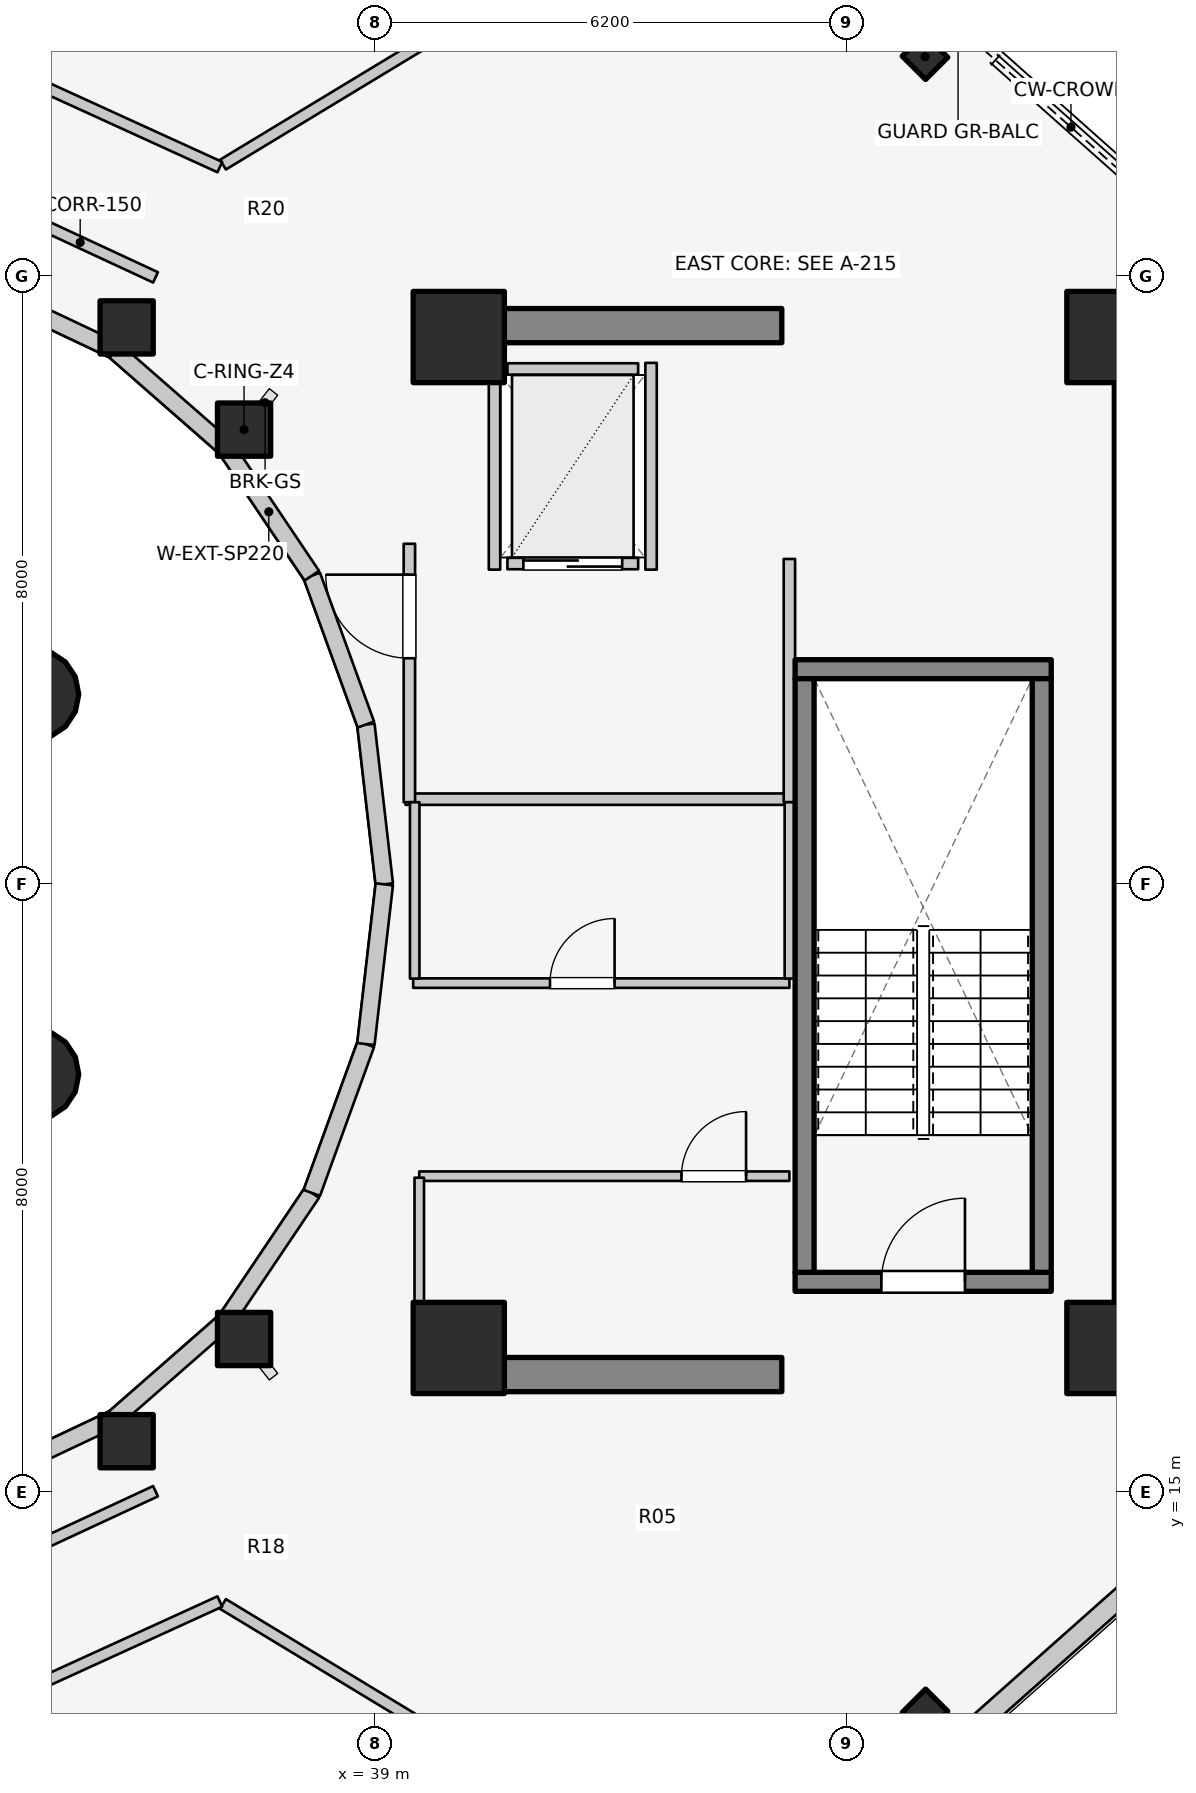
"""IFC4 building model, lengths in metres.
Left out: names, types, materials, properties, quantities, classifications, styles, units other than length and angle.
Written with IfcOpenShell. Run it as: python <this file> out.ifc"""

import sys

from ifc_helpers import new_model, si_unit, direction, frame, frame_2d, origin, origin_2d, place, context, subcontext, project, spatial, rectangle, hollow_circle, i_section, extrude, element, fill, save


model = new_model("IFC4")
c1 = context("Model", 3, precision=1e-05, world=origin(), true_north=direction((0.0, 1.0)))
c2 = subcontext(c1, "Body", "Model", "MODEL_VIEW")
j1 = project(units=[si_unit("LENGTHUNIT", "METRE"), si_unit("PLANEANGLEUNIT", "RADIAN")], contexts=[c1])
p1 = place(None, origin())
s1 = spatial("IfcSite", under=j1, at=p1, CompositionType="ELEMENT")
p2 = place(p1, origin())
s2 = spatial("IfcBuilding", under=s1, at=p2, CompositionType="ELEMENT")
p3 = place(p2, frame((0.0, 0.0, 266.8)))
s3 = spatial("IfcBuildingStorey", under=s2, at=p3, CompositionType="ELEMENT", Elevation=266.8)
p4 = place(p3, frame((48.95, 17.05, 0.0), z_axis=(0.0, 0.0, 1.0), x_axis=(0.0, 1.0, 0.0)))
e1 = element("IfcWall", 1, at=p4, inside=s3, PredefinedType="SHEAR", context=c2, shape_type="SweptSolid", body=[
    extrude(rectangle(XDim=12.8, YDim=0.45, at=frame_2d((6.4, 0.0))), origin(), (0.0, 0.0, 1.0), 3.2),
])
for number, where, z_axis, x_axis in (
    (2, (39.85, 16.55, 0.0), (0.0, 0.0, 1.0), (1.0, 0.0, 0.0)),
    (3, (39.85, 30.35, 0.0), (0.0, 0.0, 1.0), (1.0, 0.0, 0.0)),
):
    element("IfcWall", number, at=place(p3, frame(where, z_axis=z_axis, x_axis=x_axis)), inside=s3, PredefinedType="SHEAR", context=c2, shape_type="SweptSolid", body=[
        extrude(rectangle(XDim=4.5, YDim=0.45, at=frame_2d((2.25, 0.0))), origin(), (0.0, 0.0, 1.0), 3.2),
    ])
p5 = place(p3, frame((44.525, 17.77, 0.0), z_axis=(0.0, 0.0, 1.0), x_axis=(1.0, 0.0, 0.0)))
e4 = element("IfcWall", 4, at=p5, inside=s3, PredefinedType="SOLIDWALL", context=c2, shape_type="SweptSolid", body=[
    extrude(rectangle(XDim=3.37, YDim=0.25, at=frame_2d((1.685, 0.0))), origin(), (0.0, 0.0, 1.0), 3.2),
])
p6 = place(p5, frame((1.135, 0.0, 0.0)))
e5 = element("IfcOpeningElement", 5, at=p6, cuts=e4, PredefinedType="OPENING", context=c2, shape_type="SweptSolid", body=[
    extrude(rectangle(XDim=1.1, YDim=2.1, at=frame_2d((0.55, 1.05))), frame((0.0, 0.135, 0.0), z_axis=(0.0, -1.0, 0.0), x_axis=(1.0, 0.0, 0.0)), (0.0, 0.0, 1.0), 0.27),
])
p7 = place(p3, frame((44.525, 25.83, 0.0), z_axis=(0.0, 0.0, 1.0), x_axis=(1.0, 0.0, 0.0)))
e6 = element("IfcWall", 6, at=p7, inside=s3, PredefinedType="SOLIDWALL", context=c2, shape_type="SweptSolid", body=[
    extrude(rectangle(XDim=3.37, YDim=0.25, at=frame_2d((1.685, 0.0))), origin(), (0.0, 0.0, 1.0), 3.2),
])
for number, where, z_axis, x_axis in (
    (7, (44.65, 17.895, 0.0), (0.0, 0.0, 1.0), (0.0, 1.0, 0.0)),
    (8, (47.77, 17.895, 0.0), (0.0, 0.0, 1.0), (0.0, 1.0, 0.0)),
):
    element("IfcWall", number, at=place(p3, frame(where, z_axis=z_axis, x_axis=x_axis)), inside=s3, PredefinedType="SOLIDWALL", context=c2, shape_type="SweptSolid", body=[
        extrude(rectangle(XDim=7.81, YDim=0.25, at=frame_2d((3.905, 0.0))), origin(), (0.0, 0.0, 1.0), 3.2),
    ])
for number, where, z_axis, x_axis in (
    (9, (40.1, 16.9, 0.0), (0.0, 0.0, 1.0), (1.0, 0.0, 0.0)),
    (10, (48.7, 16.9, 0.0), (0.0, 0.0, 1.0), (1.0, 0.0, 0.0)),
    (11, (48.7, 30.2, 0.0), (0.0, 0.0, 1.0), (1.0, 0.0, 0.0)),
    (12, (40.1, 30.2, 0.0), (0.0, 0.0, 1.0), (1.0, 0.0, 0.0)),
):
    element("IfcColumn", number, at=place(p3, frame(where, z_axis=z_axis, x_axis=x_axis)), inside=s3, PredefinedType="COLUMN", context=c2, shape_type="SweptSolid", body=[
        extrude(rectangle(XDim=1.2, YDim=1.2, at=origin_2d()), origin(), (0.0, 0.0, 1.0), 3.2),
    ])
p8 = place(p3, frame((37.275, 28.982, 0.0), z_axis=(0.0, 0.0, 1.0), x_axis=(1.0, 0.0, 0.0)))
e13 = element("IfcColumn", 13, at=p8, inside=s3, PredefinedType="COLUMN", context=c2, shape_type="SweptSolid", body=[
    extrude(rectangle(XDim=0.7, YDim=0.7, at=origin_2d()), origin(), (0.0, 0.0, 1.0), 3.2),
])
p9 = place(p3, frame((46.234, 33.887, 0.0), z_axis=(0.0, 0.0, 1.0), x_axis=(0.707106781187, 0.707106781187, 0.0)))
e14 = element("IfcColumn", 14, at=p9, inside=s3, PredefinedType="COLUMN", context=c2, shape_type="SweptSolid", body=[
    extrude(i_section(OverallWidth=0.412, OverallDepth=0.435, WebThickness=0.036, FlangeThickness=0.057, FilletRadius=0.025, at=origin_2d()), origin(), (0.0, 0.0, 1.0), 3.2),
])
for number, where, z_axis, x_axis in (
    (15, (35.73, 30.327, 0.0), (0.0, 0.0, 1.0), (1.0, 0.0, 0.0)),
    (16, (35.73, 15.673, 0.0), (0.0, 0.0, 1.0), (1.0, 0.0, 0.0)),
    (17, (37.275, 17.018, 0.0), (0.0, 0.0, 1.0), (1.0, 0.0, 0.0)),
):
    element("IfcColumn", number, at=place(p3, frame(where, z_axis=z_axis, x_axis=x_axis)), inside=s3, PredefinedType="COLUMN", context=c2, shape_type="SweptSolid", body=[
        extrude(rectangle(XDim=0.7, YDim=0.7, at=origin_2d()), origin(), (0.0, 0.0, 1.0), 3.2),
    ])
p10 = place(p3, frame((46.234, 12.113, 0.0), z_axis=(0.0, 0.0, 1.0), x_axis=(0.707106781187, -0.707106781187, 0.0)))
e18 = element("IfcColumn", 18, at=p10, inside=s3, PredefinedType="COLUMN", context=c2, shape_type="SweptSolid", body=[
    extrude(i_section(OverallWidth=0.412, OverallDepth=0.435, WebThickness=0.036, FlangeThickness=0.057, FilletRadius=0.025, at=origin_2d()), origin(), (0.0, 0.0, 1.0), 3.2),
])
for number, where, z_axis, x_axis in (
    (19, (34.5, 20.5, 0.0), (0.0, 0.0, 1.0), (1.0, 0.0, 0.0)),
    (20, (34.5, 25.5, 0.0), (0.0, 0.0, 1.0), (1.0, 0.0, 0.0)),
):
    element("IfcColumn", number, at=place(p3, frame(where, z_axis=z_axis, x_axis=x_axis)), inside=s3, PredefinedType="PILASTER", context=c2, shape_type="SweptSolid", body=[
        extrude(hollow_circle(Radius=0.6, WallThickness=0.032, at=origin_2d()), origin(), (0.0, 0.0, 1.0), 3.2),
    ])
p11 = place(p3, frame((39.12, 23.0, 0.0), z_axis=(0.0, 0.0, 1.0), x_axis=(-0.114711713601, 0.993398823617, 0.0)))
e21 = element("IfcWall", 21, at=p11, inside=s3, PredefinedType="STANDARD", context=c2, shape_type="SweptSolid", body=[
    extrude(rectangle(XDim=2.115, YDim=0.23, at=frame_2d((1.058, 0.0))), origin(), (0.0, 0.0, 1.0), 2.9),
])
p12 = place(p3, frame((38.877, 25.102, 0.0), z_axis=(0.0, 0.0, 1.0), x_axis=(-0.341423187295, 0.93990968033, 0.0)))
e22 = element("IfcWall", 22, at=p12, inside=s3, PredefinedType="STANDARD", context=c2, shape_type="SweptSolid", body=[
    extrude(rectangle(XDim=2.084, YDim=0.23, at=frame_2d((1.042, 0.0))), origin(), (0.0, 0.0, 1.0), 2.9),
])
p13 = place(p3, frame((38.166, 27.06, 0.0), z_axis=(0.0, 0.0, 1.0), x_axis=(-0.558197800898, 0.829707909492, 0.0)))
e23 = element("IfcWall", 23, at=p13, inside=s3, PredefinedType="STANDARD", context=c2, shape_type="SweptSolid", body=[
    extrude(rectangle(XDim=2.027, YDim=0.23, at=frame_2d((1.013, 0.0))), origin(), (0.0, 0.0, 1.0), 1.32),
])
p14 = place(p3, frame((37.035, 28.742, 0.0), z_axis=(0.0, 0.0, 1.0), x_axis=(-0.752576694707, 0.658504607869, 0.0)))
e24 = element("IfcWall", 24, at=p14, inside=s3, PredefinedType="STANDARD", context=c2, shape_type="SweptSolid", body=[
    extrude(rectangle(XDim=1.959, YDim=0.23, at=frame_2d((0.98, 0.0))), origin(), (0.0, 0.0, 1.0), 1.32),
])
for number, where, z_axis, x_axis in (
    (25, (35.56, 30.032, 0.0), (0.0, 0.0, 1.0), (-0.904, 0.427, 0.0)),
    (26, (33.843, 15.157, 0.0), (0.0, 0.0, 1.0), (0.904, 0.427, 0.0)),
):
    element("IfcWall", number, at=place(p3, frame(where, z_axis=z_axis, x_axis=x_axis)), inside=s3, PredefinedType="STANDARD", context=c2, shape_type="SweptSolid", body=[
        extrude(rectangle(XDim=1.899, YDim=0.23, at=frame_2d((0.95, 0.0))), origin(), (0.0, 0.0, 1.0), 1.32),
    ])
p15 = place(p3, frame((35.56, 15.968, 0.0), z_axis=(0.0, 0.0, 1.0), x_axis=(0.752576694707, 0.658504607869, 0.0)))
e27 = element("IfcWall", 27, at=p15, inside=s3, PredefinedType="STANDARD", context=c2, shape_type="SweptSolid", body=[
    extrude(rectangle(XDim=1.959, YDim=0.23, at=frame_2d((0.98, 0.0))), origin(), (0.0, 0.0, 1.0), 1.32),
])
p16 = place(p3, frame((37.035, 17.258, 0.0), z_axis=(0.0, 0.0, 1.0), x_axis=(0.558197800898, 0.829707909492, 0.0)))
e28 = element("IfcWall", 28, at=p16, inside=s3, PredefinedType="STANDARD", context=c2, shape_type="SweptSolid", body=[
    extrude(rectangle(XDim=2.027, YDim=0.23, at=frame_2d((1.013, 0.0))), origin(), (0.0, 0.0, 1.0), 1.32),
])
p17 = place(p3, frame((38.166, 18.94, 0.0), z_axis=(0.0, 0.0, 1.0), x_axis=(0.341423187295, 0.93990968033, 0.0)))
e29 = element("IfcWall", 29, at=p17, inside=s3, PredefinedType="STANDARD", context=c2, shape_type="SweptSolid", body=[
    extrude(rectangle(XDim=2.084, YDim=0.23, at=frame_2d((1.042, 0.0))), origin(), (0.0, 0.0, 1.0), 2.9),
])
p18 = place(p3, frame((38.877, 20.898, 0.0), z_axis=(0.0, 0.0, 1.0), x_axis=(0.114711713601, 0.993398823617, 0.0)))
e30 = element("IfcWall", 30, at=p18, inside=s3, PredefinedType="STANDARD", context=c2, shape_type="SweptSolid", body=[
    extrude(rectangle(XDim=2.115, YDim=0.23, at=frame_2d((1.058, 0.0))), origin(), (0.0, 0.0, 1.0), 2.9),
])
p19 = place(p3, frame((46.647, 11.7, 0.0), z_axis=(0.0, 0.0, 1.0), x_axis=(0.747666410784, 0.664074497467, 0.0)))
e31 = element("IfcWall", 31, at=p19, inside=s3, PredefinedType="STANDARD", context=c2, shape_type="SweptSolid", body=[
    extrude(rectangle(XDim=4.033, YDim=0.26, at=frame_2d((2.017, 0.0))), origin(), (0.0, 0.0, 1.0), 1.32),
])
p20 = place(p3, frame((40.74, 27.22, 0.0), z_axis=(0.0, 0.0, 1.0), x_axis=(1.0, 0.0, 0.0)))
e32 = element("IfcWall", 32, at=p20, inside=s3, PredefinedType="SOLIDWALL", context=c2, shape_type="SweptSolid", body=[
    extrude(rectangle(XDim=1.72, YDim=0.15, at=frame_2d((0.86, 0.0))), origin(), (0.0, 0.0, 1.0), 2.915),
])
p21 = place(p20, frame((0.21, 0.0, 0.0)))
e33 = element("IfcOpeningElement", 33, at=p21, cuts=e32, PredefinedType="OPENING", context=c2, shape_type="SweptSolid", body=[
    extrude(rectangle(XDim=1.3, YDim=2.1, at=frame_2d((0.65, 1.05))), frame((0.0, 0.085, 0.0), z_axis=(0.0, -1.0, 0.0), x_axis=(1.0, 0.0, 0.0)), (0.0, 0.0, 1.0), 0.17),
])
p22 = place(p3, frame((40.74, 29.78, 0.0), z_axis=(0.0, 0.0, 1.0), x_axis=(1.0, 0.0, 0.0)))
e34 = element("IfcWall", 34, at=p22, inside=s3, PredefinedType="SOLIDWALL", context=c2, shape_type="SweptSolid", body=[
    extrude(rectangle(XDim=1.72, YDim=0.15, at=frame_2d((0.86, 0.0))), origin(), (0.0, 0.0, 1.0), 2.915),
])
for number, where, z_axis, x_axis in (
    (35, (40.57, 27.14, 0.0), (0.0, 0.0, 1.0), (0.0, 1.0, 0.0)),
    (36, (42.63, 27.14, 0.0), (0.0, 0.0, 1.0), (0.0, 1.0, 0.0)),
):
    element("IfcWall", number, at=place(p3, frame(where, z_axis=z_axis, x_axis=x_axis)), inside=s3, PredefinedType="SOLIDWALL", context=c2, shape_type="SweptSolid", body=[
        extrude(rectangle(XDim=2.72, YDim=0.15, at=frame_2d((1.36, 0.0))), origin(), (0.0, 0.0, 1.0), 2.915),
    ])
p23 = place(p3, frame((39.4, 24.12, 0.0), z_axis=(0.0, 0.0, 1.0), x_axis=(1.0, 0.0, 0.0)))
e37 = element("IfcWall", 37, at=p23, inside=s3, PredefinedType="PARTITIONING", context=c2, shape_type="SweptSolid", body=[
    extrude(rectangle(XDim=5.08, YDim=0.15, at=frame_2d((2.54, 0.0))), origin(), (0.0, 0.0, 1.0), 2.22),
])
p24 = place(p3, frame((44.45, 24.08, 0.0), z_axis=(0.0, 0.0, 1.0), x_axis=(0.0, 1.0, 0.0)))
e38 = element("IfcWall", 38, at=p24, inside=s3, PredefinedType="PARTITIONING", context=c2, shape_type="SweptSolid", body=[
    extrude(rectangle(XDim=3.2, YDim=0.15, at=frame_2d((1.6, 0.0))), origin(), (0.0, 0.0, 1.0), 2.915),
])
p25 = place(p3, frame((39.45, 24.08, 0.0), z_axis=(0.0, 0.0, 1.0), x_axis=(0.0, 1.0, 0.0)))
e39 = element("IfcWall", 39, at=p25, inside=s3, PredefinedType="PARTITIONING", context=c2, shape_type="SweptSolid", body=[
    extrude(rectangle(XDim=3.4, YDim=0.15, at=frame_2d((1.7, 0.0))), origin(), (0.0, 0.0, 1.0), 2.915),
])
p26 = place(p25, frame((1.894, 0.0, 0.0)))
e40 = element("IfcOpeningElement", 40, at=p26, cuts=e39, PredefinedType="OPENING", context=c2, shape_type="SweptSolid", body=[
    extrude(rectangle(XDim=1.1, YDim=2.1, at=frame_2d((0.55, 1.05))), frame((0.0, 0.085, 0.0), z_axis=(0.0, -1.0, 0.0), x_axis=(1.0, 0.0, 0.0)), (0.0, 0.0, 1.0), 0.17),
])
p27 = place(p3, frame((39.58, 19.16, 0.0), z_axis=(0.0, 0.0, 1.0), x_axis=(1.0, 0.0, 0.0)))
e41 = element("IfcWall", 41, at=p27, inside=s3, PredefinedType="PARTITIONING", context=c2, shape_type="SweptSolid", body=[
    extrude(rectangle(XDim=4.87, YDim=0.125, at=frame_2d((2.435, 0.0))), origin(), (0.0, 0.0, 1.0), 2.22),
])
p28 = place(p27, frame((3.45, 0.0, 0.0)))
e42 = element("IfcOpeningElement", 42, at=p28, cuts=e41, PredefinedType="OPENING", context=c2, shape_type="SweptSolid", body=[
    extrude(rectangle(XDim=0.85, YDim=2.05, at=frame_2d((0.425, 1.025))), frame((0.0, 0.073, 0.0), z_axis=(0.0, -1.0, 0.0), x_axis=(1.0, 0.0, 0.0)), (0.0, 0.0, 1.0), 0.145),
])
p29 = place(p3, frame((39.58, 17.1, 0.0), z_axis=(0.0, 0.0, 1.0), x_axis=(0.0, 1.0, 0.0)))
e43 = element("IfcWall", 43, at=p29, inside=s3, PredefinedType="PARTITIONING", context=c2, shape_type="SweptSolid", body=[
    extrude(rectangle(XDim=2.04, YDim=0.125, at=frame_2d((1.02, 0.0))), origin(), (0.0, 0.0, 1.0), 2.491),
])
p30 = place(p3, frame((39.5, 21.7, 0.0), z_axis=(0.0, 0.0, 1.0), x_axis=(1.0, 0.0, 0.0)))
e44 = element("IfcWall", 44, at=p30, inside=s3, PredefinedType="PARTITIONING", context=c2, shape_type="SweptSolid", body=[
    extrude(rectangle(XDim=4.95, YDim=0.125, at=frame_2d((2.475, 0.0))), origin(), (0.0, 0.0, 1.0), 2.22),
])
p31 = place(p30, frame((1.8, 0.0, 0.0)))
e45 = element("IfcOpeningElement", 45, at=p31, cuts=e44, PredefinedType="OPENING", context=c2, shape_type="SweptSolid", body=[
    extrude(rectangle(XDim=0.85, YDim=2.05, at=frame_2d((0.425, 1.025))), frame((0.0, 0.073, 0.0), z_axis=(0.0, -1.0, 0.0), x_axis=(1.0, 0.0, 0.0)), (0.0, 0.0, 1.0), 0.145),
])
for number, where, z_axis, x_axis in (
    (46, (39.52, 21.76, 0.0), (0.0, 0.0, 1.0), (0.0, 1.0, 0.0)),
    (47, (44.45, 21.76, 0.0), (0.0, 0.0, 1.0), (0.0, 1.0, 0.0)),
):
    element("IfcWall", number, at=place(p3, frame(where, z_axis=z_axis, x_axis=x_axis)), inside=s3, PredefinedType="PARTITIONING", context=c2, shape_type="SweptSolid", body=[
        extrude(rectangle(XDim=2.32, YDim=0.125, at=frame_2d((1.16, 0.0))), origin(), (0.0, 0.0, 1.0), 2.915),
    ])
for number, where, z_axis, x_axis in (
    (48, (36.11, 30.985, 0.0), (0.0, 0.0, 1.0), (-0.907, 0.421, 0.0)),
    (49, (34.127, 14.094, 0.0), (0.0, 0.0, 1.0), (0.907, 0.421, 0.0)),
):
    element("IfcWall", number, at=place(p3, frame(where, z_axis=z_axis, x_axis=x_axis)), inside=s3, PredefinedType="PARTITIONING", context=c2, shape_type="SweptSolid", body=[
        extrude(rectangle(XDim=2.186, YDim=0.15, at=frame_2d((1.093, 0.0))), origin(), (0.0, 0.0, 1.0), 1.32),
    ])
for number, where, z_axis, x_axis in (
    (50, (36.997, 32.468, 0.0), (0.0, 0.0, 1.0), (0.856, 0.518, 0.0)),
    (51, (36.997, 13.532, 0.0), (0.0, 0.0, 1.0), (0.856, -0.518, 0.0)),
):
    element("IfcWall", number, at=place(p3, frame(where, z_axis=z_axis, x_axis=x_axis)), inside=s3, PredefinedType="PARTITIONING", context=c2, shape_type="SweptSolid", body=[
        extrude(rectangle(XDim=6.736, YDim=0.15, at=frame_2d((3.368, 0.0))), origin(), (0.0, 0.0, 1.0), 1.32),
    ])
for number, where, z_axis, x_axis in (
    (52, (36.956, 32.436, 0.0), (0.0, 0.0, 1.0), (-0.91, 0.415, 0.0)),
    (53, (34.561, 12.471, 0.0), (0.0, 0.0, 1.0), (0.91, 0.415, 0.0)),
):
    element("IfcWall", number, at=place(p3, frame(where, z_axis=z_axis, x_axis=x_axis)), inside=s3, PredefinedType="PARTITIONING", context=c2, shape_type="SweptSolid", body=[
        extrude(rectangle(XDim=2.633, YDim=0.15, at=frame_2d((1.317, 0.0))), origin(), (0.0, 0.0, 1.0), 1.32),
    ])
p32 = place(p6, origin())
e54 = element("IfcDoor", 54, at=p32, inside=s3, OperationType="SINGLE_SWING_RIGHT", PredefinedType="DOOR", context=c2, shape_type="SweptSolid", body=[
    extrude(rectangle(XDim=1.1, YDim=2.1, at=frame_2d((0.55, 1.05))), frame((0.0, 0.025, 0.0), z_axis=(0.0, -1.0, 0.0), x_axis=(1.0, 0.0, 0.0)), (0.0, 0.0, 1.0), 0.05),
])
fill(e5, e54)
p33 = place(p21, origin())
e55 = element("IfcDoor", 55, at=p33, inside=s3, OperationType="DOUBLE_DOOR_SLIDING", PredefinedType="DOOR", context=c2, shape_type="SweptSolid", body=[
    extrude(rectangle(XDim=1.3, YDim=2.1, at=frame_2d((0.65, 1.05))), frame((0.0, 0.025, 0.0), z_axis=(0.0, -1.0, 0.0), x_axis=(1.0, 0.0, 0.0)), (0.0, 0.0, 1.0), 0.05),
])
fill(e33, e55)
p34 = place(p26, origin())
e56 = element("IfcDoor", 56, at=p34, inside=s3, OperationType="SINGLE_SWING_RIGHT", PredefinedType="DOOR", context=c2, shape_type="SweptSolid", body=[
    extrude(rectangle(XDim=1.1, YDim=2.1, at=frame_2d((0.55, 1.05))), frame((0.0, 0.025, 0.0), z_axis=(0.0, -1.0, 0.0), x_axis=(1.0, 0.0, 0.0)), (0.0, 0.0, 1.0), 0.05),
])
fill(e40, e56)
p35 = place(p28, origin())
e57 = element("IfcDoor", 57, at=p35, inside=s3, OperationType="SINGLE_SWING_RIGHT", PredefinedType="DOOR", context=c2, shape_type="SweptSolid", body=[
    extrude(rectangle(XDim=0.85, YDim=2.05, at=frame_2d((0.425, 1.025))), frame((0.0, 0.025, 0.0), z_axis=(0.0, -1.0, 0.0), x_axis=(1.0, 0.0, 0.0)), (0.0, 0.0, 1.0), 0.05),
])
fill(e42, e57)
p36 = place(p31, origin())
e58 = element("IfcDoor", 58, at=p36, inside=s3, OperationType="SINGLE_SWING_RIGHT", PredefinedType="DOOR", context=c2, shape_type="SweptSolid", body=[
    extrude(rectangle(XDim=0.85, YDim=2.05, at=frame_2d((0.425, 1.025))), frame((0.0, 0.025, 0.0), z_axis=(0.0, -1.0, 0.0), x_axis=(1.0, 0.0, 0.0)), (0.0, 0.0, 1.0), 0.05),
])
fill(e45, e58)
save(model, sys.argv[1])
